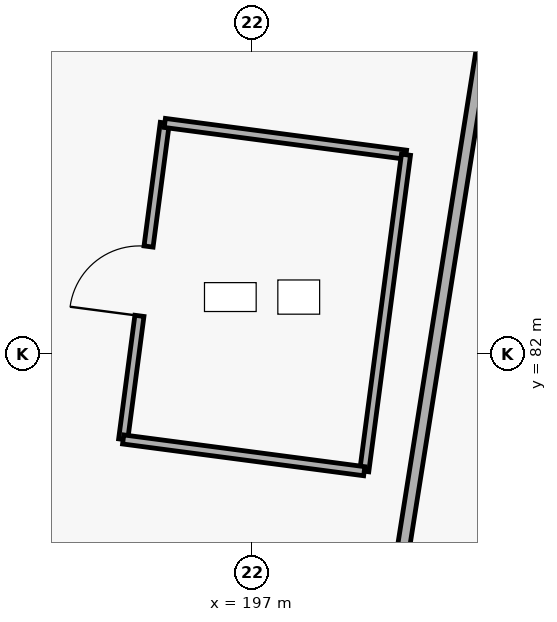
"""IFC4 building model, lengths in metres.
Left out: names, types, materials, properties, quantities, classifications, styles, units other than length and angle.
Written with IfcOpenShell. Run it as: python <this file> out.ifc"""

import sys

from ifc_helpers import new_model, si_unit, direction, frame, frame_2d, origin, place, context, subcontext, project, spatial, rectangle, extrude, element, fill, save


model = new_model("IFC4")
c1 = context("Model", 3, precision=1e-05, world=origin(), true_north=direction((0.0, 1.0)))
c2 = subcontext(c1, "Body", "Model", "MODEL_VIEW")
j1 = project(units=[si_unit("LENGTHUNIT", "METRE"), si_unit("PLANEANGLEUNIT", "RADIAN")], contexts=[c1])
p1 = place(None, origin())
s1 = spatial("IfcSite", under=j1, at=p1, CompositionType="ELEMENT")
p2 = place(p1, origin())
s2 = spatial("IfcBuilding", under=s1, at=p2, CompositionType="ELEMENT")
p3 = place(p2, frame((0.0, 0.0, 19.8)))
s3 = spatial("IfcBuildingStorey", under=s2, at=p3, CompositionType="ELEMENT", Elevation=19.8)
p4 = place(p3, frame((195.305, 80.873, 0.0), z_axis=(0.0, 0.0, 1.0), x_axis=(0.130499622762, 0.991448358947, 0.0)))
e1 = element("IfcWall", 1, at=p4, inside=s3, PredefinedType="PARTITIONING", context=c2, shape_type="SweptSolid", body=[
    extrude(rectangle(XDim=4.2, YDim=0.12, at=frame_2d((2.1, 0.0))), origin(), (0.0, 0.0, 1.0), 4.52),
])
p5 = place(p4, frame((1.64, 0.0, 0.0)))
e2 = element("IfcOpeningElement", 2, at=p5, cuts=e1, PredefinedType="OPENING", context=c2, shape_type="SweptSolid", body=[
    extrude(rectangle(XDim=0.92, YDim=2.15, at=frame_2d((0.46, 1.075))), frame((0.0, 0.07, 0.0), z_axis=(0.0, -1.0, 0.0), x_axis=(1.0, 0.0, 0.0)), (0.0, 0.0, 1.0), 0.14),
])
p6 = place(p3, frame((195.853, 85.037, 0.0), z_axis=(0.0, 0.0, 1.0), x_axis=(0.991424669245, -0.130679475101, 0.0)))
e3 = element("IfcWall", 3, at=p6, inside=s3, PredefinedType="PARTITIONING", context=c2, shape_type="SweptSolid", body=[
    extrude(rectangle(XDim=3.2, YDim=0.12, at=frame_2d((1.6, 0.0))), origin(), (0.0, 0.0, 1.0), 4.52),
])
p7 = place(p3, frame((199.026, 84.619, 0.0), z_axis=(0.0, 0.0, 1.0), x_axis=(-0.130678565003, -0.991424789204, 0.0)))
e4 = element("IfcWall", 4, at=p7, inside=s3, PredefinedType="PARTITIONING", context=c2, shape_type="SweptSolid", body=[
    extrude(rectangle(XDim=4.2, YDim=0.12, at=frame_2d((2.1, 0.0))), origin(), (0.0, 0.0, 1.0), 4.52),
])
p8 = place(p3, frame((198.477, 80.455, 0.0), z_axis=(0.0, 0.0, 1.0), x_axis=(-0.991430644985, 0.13063413101, 0.0)))
e5 = element("IfcWall", 5, at=p8, inside=s3, PredefinedType="PARTITIONING", context=c2, shape_type="SweptSolid", body=[
    extrude(rectangle(XDim=3.199, YDim=0.12, at=frame_2d((1.6, 0.0))), origin(), (0.0, 0.0, 1.0), 4.52),
])
p9 = place(p3, frame((197.948, 72.853, 0.0), z_axis=(0.0, 0.0, 1.0), x_axis=(0.156404265147, 0.987693123315, 0.0)))
e6 = element("IfcWall", 6, at=p9, inside=s3, PredefinedType="PARTITIONING", context=c2, shape_type="SweptSolid", body=[
    extrude(rectangle(XDim=19.385, YDim=0.16, at=frame_2d((9.693, 0.0))), origin(), (0.0, 0.0, 1.0), 3.665),
])
p10 = place(p9, frame((2.796, 0.0, 0.0)))
e7 = element("IfcOpeningElement", 7, at=p10, cuts=e6, PredefinedType="OPENING", context=c2, shape_type="SweptSolid", body=[
    extrude(rectangle(XDim=1.2, YDim=2.25, at=frame_2d((0.6, 1.125))), frame((0.0, 0.09, 0.0), z_axis=(0.0, -1.0, 0.0), x_axis=(1.0, 0.0, 0.0)), (0.0, 0.0, 1.0), 0.18),
])
p11 = place(p5, origin())
e8 = element("IfcDoor", 8, at=p11, inside=s3, OperationType="SINGLE_SWING_LEFT", PredefinedType="DOOR", context=c2, shape_type="SweptSolid", body=[
    extrude(rectangle(XDim=0.92, YDim=2.15, at=frame_2d((0.46, 1.075))), frame((0.0, 0.025, 0.0), z_axis=(0.0, -1.0, 0.0), x_axis=(1.0, 0.0, 0.0)), (0.0, 0.0, 1.0), 0.05),
])
fill(e2, e8)
save(model, sys.argv[1])
